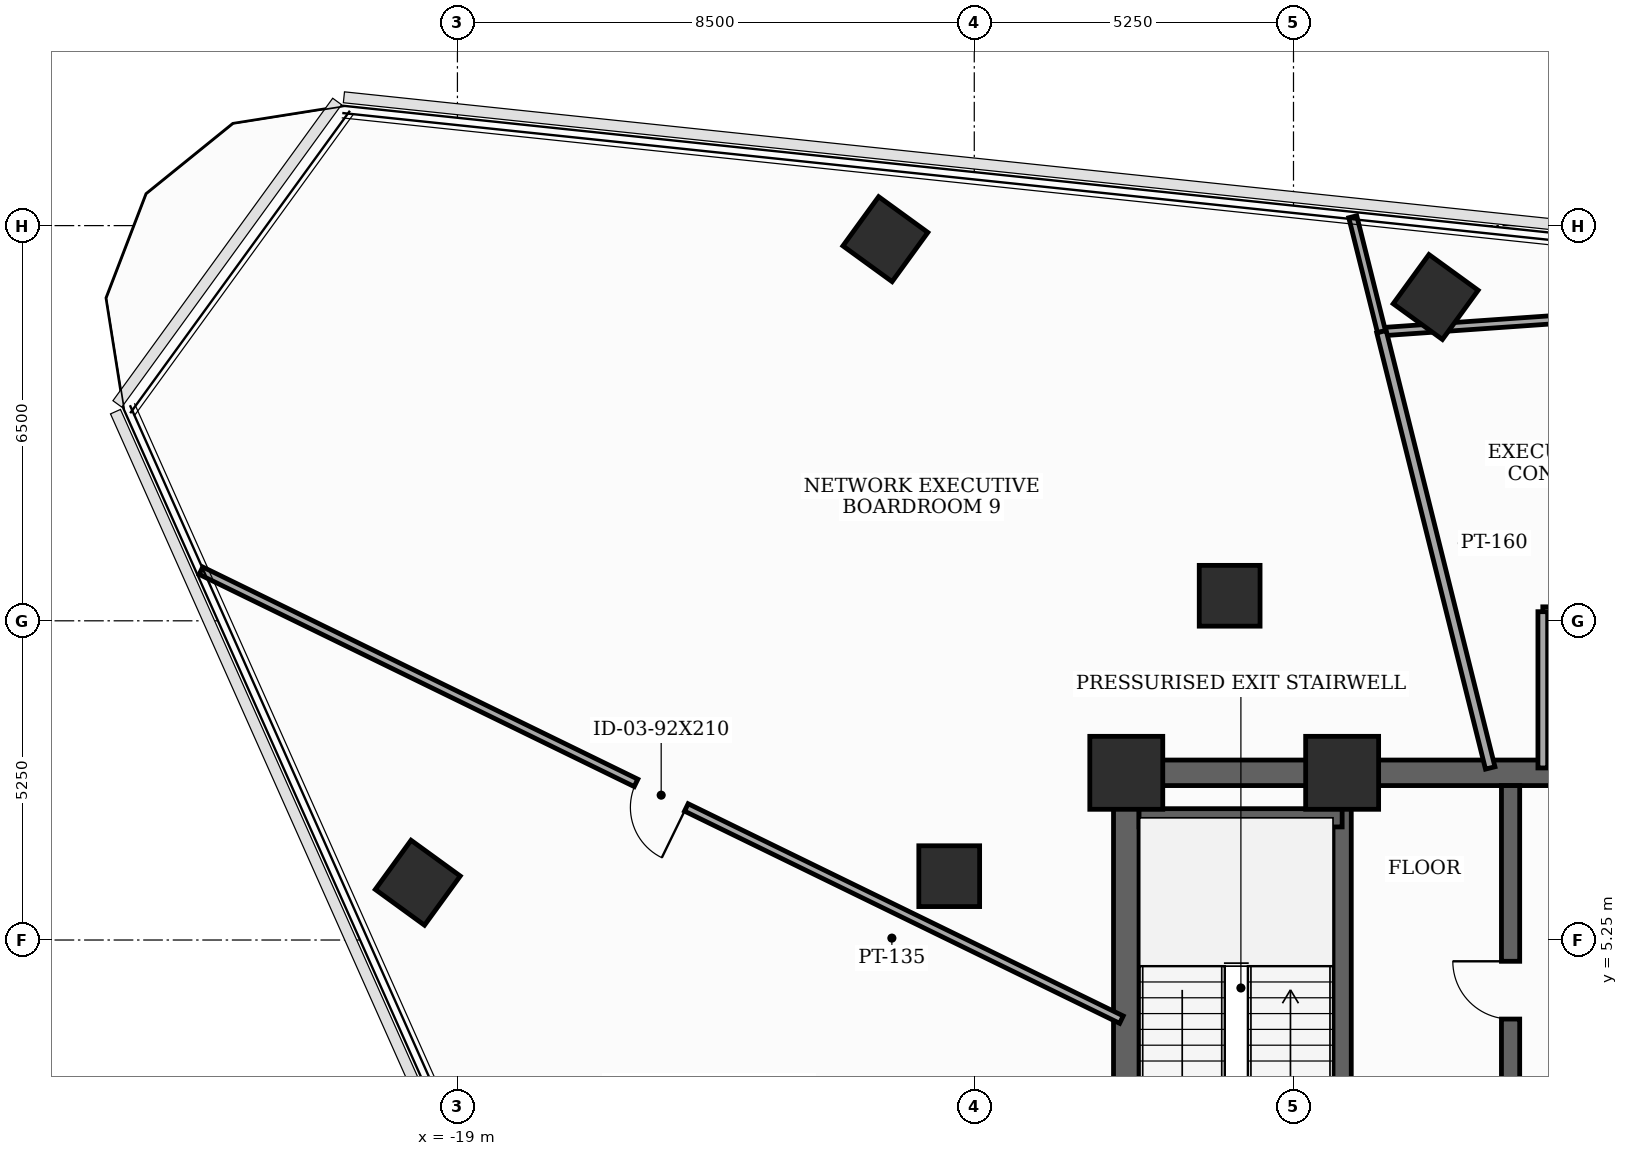
"""IFC4 building model, lengths in metres.
Left out: names, types, materials, properties, quantities, classifications, styles, units other than length and angle.
Written with IfcOpenShell. Run it as: python <this file> out.ifc"""

import sys

from ifc_helpers import new_model, si_unit, direction, frame, frame_2d, origin, origin_2d, place, context, subcontext, project, spatial, rectangle, extrude, element, fill, save


model = new_model("IFC4")
c1 = context("Model", 3, precision=1e-05, world=origin(), true_north=direction((0.0, 1.0)))
c2 = subcontext(c1, "Body", "Model", "MODEL_VIEW")
j1 = project(units=[si_unit("LENGTHUNIT", "METRE"), si_unit("PLANEANGLEUNIT", "RADIAN")], contexts=[c1])
p1 = place(None, origin())
s1 = spatial("IfcSite", under=j1, at=p1, CompositionType="ELEMENT")
p2 = place(p1, origin())
s2 = spatial("IfcBuilding", under=s1, at=p2, CompositionType="ELEMENT")
p3 = place(p2, frame((0.0, 0.0, 218.9)))
s3 = spatial("IfcBuildingStorey", under=s2, at=p3, CompositionType="ELEMENT", Elevation=218.9)
for number, where, z_axis, x_axis in (
    (1, (-4.45, 8.0, 0.0), (0.0, 0.0, 1.0), (1.0, 0.0, 0.0)),
    (2, (-8.0, 8.0, 0.0), (0.0, 0.0, 1.0), (1.0, 0.0, 0.0)),
):
    element("IfcColumn", number, at=place(p3, frame(where, z_axis=z_axis, x_axis=x_axis)), inside=s3, PredefinedType="COLUMN", context=c2, shape_type="SweptSolid", body=[
        extrude(rectangle(XDim=1.2, YDim=1.2, at=origin_2d()), origin(), (0.0, 0.0, 1.0), 3.7),
    ])
for number, where, z_axis, x_axis in (
    (3, (-6.3, 10.912, 0.0), (0.0, 0.0, 1.0), (1.0, 0.0, 0.0)),
    (4, (-10.912, 6.3, 0.0), (0.0, 0.0, 1.0), (1.0, 0.0, 0.0)),
    (5, (-2.912, 15.826, 0.0), (0.0, 0.0, 1.0), (0.588, 0.809, 0.0)),
    (6, (-11.962, 16.777, 0.0), (0.0, 0.0, 1.0), (0.588, 0.809, 0.0)),
    (7, (-19.652, 6.192, 0.0), (0.0, 0.0, 1.0), (0.588, 0.809, 0.0)),
):
    element("IfcColumn", number, at=place(p3, frame(where, z_axis=z_axis, x_axis=x_axis)), inside=s3, PredefinedType="COLUMN", context=c2, shape_type="SweptSolid", body=[
        extrude(rectangle(XDim=1.0, YDim=1.0, at=origin_2d()), origin(), (0.0, 0.0, 1.0), 3.7),
    ])
p4 = place(p3, frame((-8.0, -8.0, 0.0), z_axis=(0.0, 0.0, 1.0), x_axis=(0.0, 1.0, 0.0)))
e8 = element("IfcWall", 8, at=p4, inside=s3, PredefinedType="SHEAR", context=c2, shape_type="SweptSolid", body=[
    extrude(rectangle(XDim=16.0, YDim=0.42, at=frame_2d((8.0, 0.0))), origin(), (0.0, 0.0, 1.0), 3.5),
])
p5 = place(p4, frame((0.761, 0.0, 0.0)))
e9 = element("IfcOpeningElement", 9, at=p5, cuts=e8, PredefinedType="OPENING", context=c2, shape_type="SweptSolid", body=[
    extrude(rectangle(XDim=0.85, YDim=2.02, at=frame_2d((0.425, 1.01))), frame((0.0, 0.22, 0.0), z_axis=(0.0, -1.0, 0.0), x_axis=(1.0, 0.0, 0.0)), (0.0, 0.0, 1.0), 0.44),
])
p6 = place(p4, frame((5.35, 0.0, 0.0)))
e10 = element("IfcOpeningElement", 10, at=p6, cuts=e8, PredefinedType="OPENING", context=c2, shape_type="SweptSolid", body=[
    extrude(rectangle(XDim=1.05, YDim=2.15, at=frame_2d((0.525, 1.075))), frame((0.0, 0.22, 0.0), z_axis=(0.0, -1.0, 0.0), x_axis=(1.0, 0.0, 0.0)), (0.0, 0.0, 1.0), 0.44),
])
p7 = place(p3, frame((-8.0, 8.0, 0.0), z_axis=(0.0, 0.0, 1.0), x_axis=(1.0, 0.0, 0.0)))
e11 = element("IfcWall", 11, at=p7, inside=s3, PredefinedType="SHEAR", context=c2, shape_type="SweptSolid", body=[
    extrude(rectangle(XDim=16.0, YDim=0.42, at=frame_2d((8.0, 0.0))), origin(), (0.0, 0.0, 1.0), 3.5),
])
p8 = place(p7, frame((7.1, 0.0, 0.0)))
e12 = element("IfcOpeningElement", 12, at=p8, cuts=e11, PredefinedType="OPENING", context=c2, shape_type="SweptSolid", body=[
    extrude(rectangle(XDim=1.8, YDim=2.15, at=frame_2d((0.9, 1.075))), frame((0.0, 0.22, 0.0), z_axis=(0.0, -1.0, 0.0), x_axis=(1.0, 0.0, 0.0)), (0.0, 0.0, 1.0), 0.44),
])
p9 = place(p3, frame((-4.45, -7.79, 0.0), z_axis=(0.0, 0.0, 1.0), x_axis=(0.0, 1.0, 0.0)))
e13 = element("IfcWall", 13, at=p9, inside=s3, PredefinedType="SHEAR", context=c2, shape_type="SweptSolid", body=[
    extrude(rectangle(XDim=15.58, YDim=0.3, at=frame_2d((7.79, 0.0))), origin(), (0.0, 0.0, 1.0), 3.5),
])
p10 = place(p3, frame((-7.79, 7.26, 0.0), z_axis=(0.0, 0.0, 1.0), x_axis=(1.0, 0.0, 0.0)))
e14 = element("IfcWall", 14, at=p10, inside=s3, PredefinedType="SHEAR", context=c2, shape_type="SweptSolid", body=[
    extrude(rectangle(XDim=3.34, YDim=0.3, at=frame_2d((1.67, 0.0))), origin(), (0.0, 0.0, 1.0), 3.5),
])
p11 = place(p3, frame((-1.68, -4.85, 0.0), z_axis=(0.0, 0.0, 1.0), x_axis=(0.0, 1.0, 0.0)))
e15 = element("IfcWall", 15, at=p11, inside=s3, PredefinedType="SHEAR", context=c2, shape_type="SweptSolid", body=[
    extrude(rectangle(XDim=12.64, YDim=0.3, at=frame_2d((6.32, 0.0))), origin(), (0.0, 0.0, 1.0), 3.5),
])
p12 = place(p11, frame((2.6, 0.0, 0.0)))
e16 = element("IfcOpeningElement", 16, at=p12, cuts=e15, PredefinedType="OPENING", context=c2, shape_type="SweptSolid", body=[
    extrude(rectangle(XDim=0.95, YDim=2.1, at=frame_2d((0.475, 1.05))), frame((0.0, 0.16, 0.0), z_axis=(0.0, -1.0, 0.0), x_axis=(1.0, 0.0, 0.0)), (0.0, 0.0, 1.0), 0.32),
])
p13 = place(p11, frame((8.8, 0.0, 0.0)))
e17 = element("IfcOpeningElement", 17, at=p13, cuts=e15, PredefinedType="OPENING", context=c2, shape_type="SweptSolid", body=[
    extrude(rectangle(XDim=0.95, YDim=2.1, at=frame_2d((0.475, 1.05))), frame((0.0, 0.16, 0.0), z_axis=(0.0, -1.0, 0.0), x_axis=(1.0, 0.0, 0.0)), (0.0, 0.0, 1.0), 0.32),
])
p14 = place(p3, frame((10.15, 10.65, 0.0), z_axis=(0.0, 0.0, 1.0), x_axis=(-1.0, 0.0, 0.0)))
e18 = element("IfcWall", 18, at=p14, inside=s3, PredefinedType="PARTITIONING", context=c2, shape_type="SweptSolid", body=[
    extrude(rectangle(XDim=11.3, YDim=0.16, at=frame_2d((5.65, 0.0))), origin(), (0.0, 0.0, 1.0), 2.885),
])
p15 = place(p14, frame((6.506, 0.0, 0.0)))
e19 = element("IfcOpeningElement", 19, at=p15, cuts=e18, PredefinedType="OPENING", context=c2, shape_type="SweptSolid", body=[
    extrude(rectangle(XDim=1.0, YDim=2.15, at=frame_2d((0.5, 1.075))), frame((0.0, 0.09, 0.0), z_axis=(0.0, -1.0, 0.0), x_axis=(1.0, 0.0, 0.0)), (0.0, 0.0, 1.0), 0.18),
])
p16 = place(p3, frame((-1.15, 10.65, 0.0), z_axis=(0.0, 0.0, 1.0), x_axis=(0.0, -1.0, 0.0)))
e20 = element("IfcWall", 20, at=p16, inside=s3, PredefinedType="PARTITIONING", context=c2, shape_type="SweptSolid", body=[
    extrude(rectangle(XDim=2.57, YDim=0.16, at=frame_2d((1.285, 0.0))), origin(), (0.0, 0.0, 1.0), 2.885),
])
p17 = place(p3, frame((-8.08, 3.941, 0.0), z_axis=(0.0, 0.0, 1.0), x_axis=(-0.898787530524, 0.438384505856, 0.0)))
e21 = element("IfcWall", 21, at=p17, inside=s3, PredefinedType="PARTITIONING", context=c2, shape_type="SweptSolid", body=[
    extrude(rectangle(XDim=16.843, YDim=0.135, at=frame_2d((8.421, 0.0))), origin(), (0.0, 0.0, 1.0), 2.885),
])
p18 = place(p17, frame((7.961, 0.0, 0.0)))
e22 = element("IfcOpeningElement", 22, at=p18, cuts=e21, PredefinedType="OPENING", context=c2, shape_type="SweptSolid", body=[
    extrude(rectangle(XDim=0.92, YDim=2.1, at=frame_2d((0.46, 1.05))), frame((0.0, 0.077, 0.0), z_axis=(0.0, -1.0, 0.0), x_axis=(1.0, 0.0, 0.0)), (0.0, 0.0, 1.0), 0.155),
])
p19 = place(p3, frame((-3.803, 15.255, 0.0), z_axis=(0.0, 0.0, 1.0), x_axis=(0.997563622011, 0.069762597718, 0.0)))
e23 = element("IfcWall", 23, at=p19, inside=s3, PredefinedType="PARTITIONING", context=c2, shape_type="SweptSolid", body=[
    extrude(rectangle(XDim=5.879, YDim=0.135, at=frame_2d((2.94, 0.0))), origin(), (0.0, 0.0, 1.0), 2.985),
])
p20 = place(p3, frame((-4.275, 17.146, 0.0), z_axis=(0.0, 0.0, 1.0), x_axis=(0.242417712213, -0.970171970738, 0.0)))
e24 = element("IfcWall", 24, at=p20, inside=s3, PredefinedType="PARTITIONING", context=c2, shape_type="SweptSolid", body=[
    extrude(rectangle(XDim=1.949, YDim=0.135, at=frame_2d((0.974, 0.0))), origin(), (0.0, 0.0, 1.0), 3.035),
])
p21 = place(p3, frame((-3.803, 15.255, 0.0), z_axis=(0.0, 0.0, 1.0), x_axis=(0.241851911951, -0.970313172479, 0.0)))
e25 = element("IfcWall", 25, at=p21, inside=s3, PredefinedType="PARTITIONING", context=c2, shape_type="SweptSolid", body=[
    extrude(rectangle(XDim=7.394, YDim=0.16, at=frame_2d((3.697, 0.0))), origin(), (0.0, 0.0, 1.0), 2.885),
])
p22 = place(p13, origin())
e26 = element("IfcDoor", 26, at=p22, inside=s3, OperationType="SINGLE_SWING_RIGHT", PredefinedType="DOOR", context=c2, shape_type="SweptSolid", body=[
    extrude(rectangle(XDim=0.95, YDim=2.1, at=frame_2d((0.475, 1.05))), frame((0.0, 0.025, 0.0), z_axis=(0.0, -1.0, 0.0), x_axis=(1.0, 0.0, 0.0)), (0.0, 0.0, 1.0), 0.05),
])
fill(e17, e26)
p23 = place(p18, origin())
e27 = element("IfcDoor", 27, at=p23, inside=s3, OperationType="SINGLE_SWING_LEFT", PredefinedType="DOOR", context=c2, shape_type="SweptSolid", body=[
    extrude(rectangle(XDim=0.92, YDim=2.1, at=frame_2d((0.46, 1.05))), frame((0.0, 0.025, 0.0), z_axis=(0.0, -1.0, 0.0), x_axis=(1.0, 0.0, 0.0)), (0.0, 0.0, 1.0), 0.05),
])
fill(e22, e27)
save(model, sys.argv[1])
